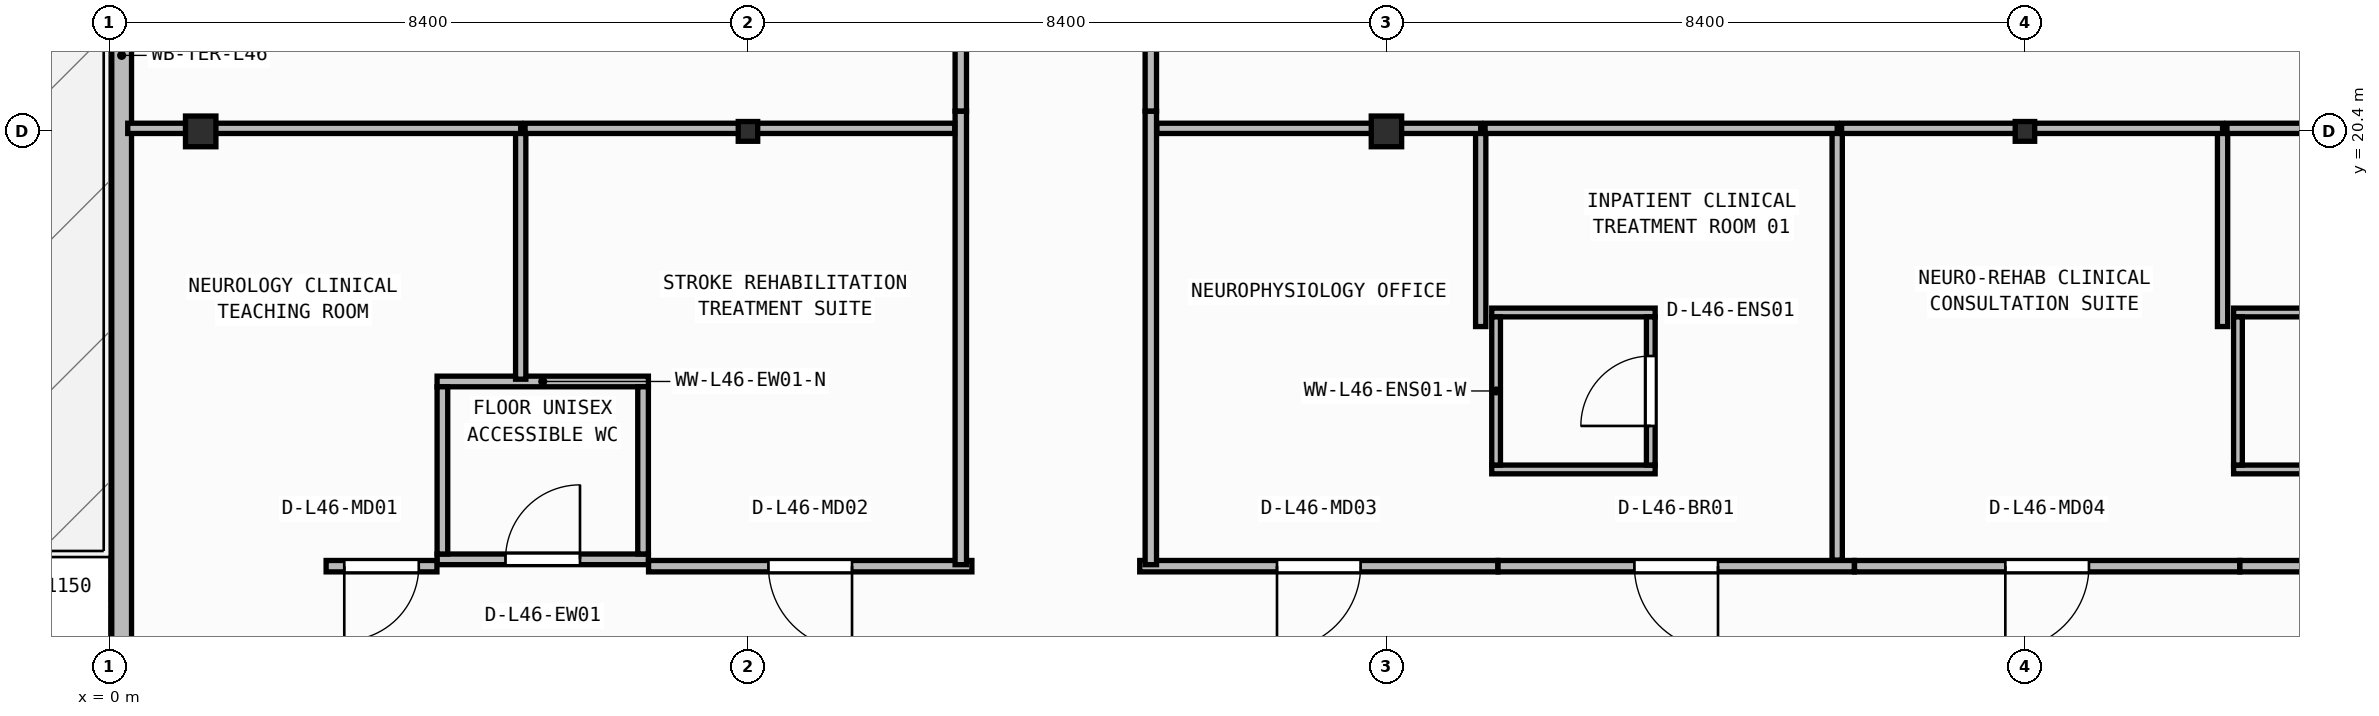
"""IFC4 building model, lengths in metres.
Left out: names, types, materials, properties, quantities, classifications, styles, units other than length and angle.
Written with IfcOpenShell. Run it as: python <this file> out.ifc"""

import sys

from ifc_helpers import new_model, si_unit, direction, frame, frame_2d, origin, origin_2d, place, context, subcontext, project, spatial, rectangle, i_section, extrude, element, fill, save


model = new_model("IFC4")
c1 = context("Model", 3, precision=1e-05, world=origin(), true_north=direction((0.0, 1.0)))
c2 = subcontext(c1, "Body", "Model", "MODEL_VIEW")
j1 = project(units=[si_unit("LENGTHUNIT", "METRE"), si_unit("PLANEANGLEUNIT", "RADIAN")], contexts=[c1])
p1 = place(None, origin())
s1 = spatial("IfcSite", under=j1, at=p1, CompositionType="ELEMENT")
p2 = place(p1, origin())
s2 = spatial("IfcBuilding", under=s1, at=p2, CompositionType="ELEMENT")
p3 = place(p2, frame((0.0, 0.0, 188.15)))
s3 = spatial("IfcBuildingStorey", under=s2, at=p3, CompositionType="ELEMENT", Elevation=188.15)
p4 = place(p3, frame((1.2, 20.4, 0.0), z_axis=(0.0, 0.0, 1.0), x_axis=(1.0, 0.0, 0.0)))
e1 = element("IfcColumn", 1, at=p4, inside=s3, PredefinedType="COLUMN", context=c2, shape_type="SweptSolid", body=[
    extrude(i_section(OverallWidth=0.4, OverallDepth=0.404, WebThickness=0.02, FlangeThickness=0.032, at=origin_2d()), origin(), (0.0, 0.0, 1.0), 3.95),
])
p5 = place(p3, frame((8.4, 20.4, 0.0), z_axis=(0.0, 0.0, 1.0), x_axis=(1.0, 0.0, 0.0)))
e2 = element("IfcColumn", 2, at=p5, inside=s3, PredefinedType="COLUMN", context=c2, shape_type="SweptSolid", body=[
    extrude(i_section(OverallWidth=0.256, OverallDepth=0.26, WebThickness=0.01, FlangeThickness=0.017, FilletRadius=0.013, at=origin_2d()), origin(), (0.0, 0.0, 1.0), 3.95),
])
p6 = place(p3, frame((16.8, 20.4, 0.0), z_axis=(0.0, 0.0, 1.0), x_axis=(1.0, 0.0, 0.0)))
e3 = element("IfcColumn", 3, at=p6, inside=s3, PredefinedType="COLUMN", context=c2, shape_type="SweptSolid", body=[
    extrude(i_section(OverallWidth=0.4, OverallDepth=0.404, WebThickness=0.02, FlangeThickness=0.032, at=origin_2d()), origin(), (0.0, 0.0, 1.0), 3.95),
])
p7 = place(p3, frame((25.2, 20.4, 0.0), z_axis=(0.0, 0.0, 1.0), x_axis=(1.0, 0.0, 0.0)))
e4 = element("IfcColumn", 4, at=p7, inside=s3, PredefinedType="COLUMN", context=c2, shape_type="SweptSolid", body=[
    extrude(i_section(OverallWidth=0.256, OverallDepth=0.26, WebThickness=0.01, FlangeThickness=0.017, FilletRadius=0.013, at=origin_2d()), origin(), (0.0, 0.0, 1.0), 3.95),
])
p8 = place(p3, frame((0.16, 40.14, 0.0), z_axis=(0.0, 0.0, 1.0), x_axis=(0.0, -1.0, 0.0)))
e5 = element("IfcWall", 5, at=p8, inside=s3, PredefinedType="STANDARD", context=c2, shape_type="SweptSolid", body=[
    extrude(rectangle(XDim=37.48, YDim=0.26, at=frame_2d((18.74, 0.0))), origin(), (0.0, 0.0, 1.0), 3.71),
])
p9 = place(p8, frame((13.926, 0.0, 0.0)))
e6 = element("IfcOpeningElement", 6, at=p9, cuts=e5, PredefinedType="OPENING", context=c2, shape_type="SweptSolid", body=[
    extrude(rectangle(XDim=1.3, YDim=2.15, at=frame_2d((0.65, 1.075))), frame((0.0, 0.14, 0.0), z_axis=(0.0, -1.0, 0.0), x_axis=(1.0, 0.0, 0.0)), (0.0, 0.0, 1.0), 0.28),
])
p10 = place(p3, frame((4.31, 14.77, 0.0), z_axis=(0.0, 0.0, 1.0), x_axis=(1.0, 0.0, 0.0)))
e7 = element("IfcWall", 7, at=p10, inside=s3, PredefinedType="PARTITIONING", context=c2, shape_type="SweptSolid", body=[
    extrude(rectangle(XDim=2.78, YDim=0.14, at=frame_2d((1.39, 0.0))), origin(), (0.0, 0.0, 1.0), 3.71),
])
p11 = place(p10, frame((0.9, 0.0, 0.0)))
e8 = element("IfcOpeningElement", 8, at=p11, cuts=e7, PredefinedType="OPENING", context=c2, shape_type="SweptSolid", body=[
    extrude(rectangle(XDim=0.98, YDim=2.1, at=frame_2d((0.49, 1.05))), frame((0.0, 0.08, 0.0), z_axis=(0.0, -1.0, 0.0), x_axis=(1.0, 0.0, 0.0)), (0.0, 0.0, 1.0), 0.16),
])
p12 = place(p3, frame((4.31, 17.11, 0.0), z_axis=(0.0, 0.0, 1.0), x_axis=(1.0, 0.0, 0.0)))
e9 = element("IfcWall", 9, at=p12, inside=s3, PredefinedType="PARTITIONING", context=c2, shape_type="SweptSolid", body=[
    extrude(rectangle(XDim=2.78, YDim=0.14, at=frame_2d((1.39, 0.0))), origin(), (0.0, 0.0, 1.0), 3.71),
])
for number, where, z_axis, x_axis in (
    (10, (4.38, 14.84, 0.0), (0.0, 0.0, 1.0), (0.0, 1.0, 0.0)),
    (11, (7.02, 14.84, 0.0), (0.0, 0.0, 1.0), (0.0, 1.0, 0.0)),
):
    element("IfcWall", number, at=place(p3, frame(where, z_axis=z_axis, x_axis=x_axis)), inside=s3, PredefinedType="PARTITIONING", context=c2, shape_type="SweptSolid", body=[
        extrude(rectangle(XDim=2.2, YDim=0.14, at=frame_2d((1.1, 0.0))), origin(), (0.0, 0.0, 1.0), 3.71),
    ])
for number, where, z_axis, x_axis in (
    (12, (18.185, 15.952, 0.0), (0.0, 0.0, 1.0), (1.0, 0.0, 0.0)),
    (13, (18.185, 18.018, 0.0), (0.0, 0.0, 1.0), (1.0, 0.0, 0.0)),
):
    element("IfcWall", number, at=place(p3, frame(where, z_axis=z_axis, x_axis=x_axis)), inside=s3, PredefinedType="PARTITIONING", context=c2, shape_type="SweptSolid", body=[
        extrude(rectangle(XDim=2.15, YDim=0.115, at=frame_2d((1.075, 0.0))), origin(), (0.0, 0.0, 1.0), 3.71),
    ])
p13 = place(p3, frame((18.242, 16.01, 0.0), z_axis=(0.0, 0.0, 1.0), x_axis=(0.0, 1.0, 0.0)))
e14 = element("IfcWall", 14, at=p13, inside=s3, PredefinedType="PARTITIONING", context=c2, shape_type="SweptSolid", body=[
    extrude(rectangle(XDim=1.95, YDim=0.115, at=frame_2d((0.975, 0.0))), origin(), (0.0, 0.0, 1.0), 3.71),
])
p14 = place(p3, frame((20.278, 16.01, 0.0), z_axis=(0.0, 0.0, 1.0), x_axis=(0.0, 1.0, 0.0)))
e15 = element("IfcWall", 15, at=p14, inside=s3, PredefinedType="PARTITIONING", context=c2, shape_type="SweptSolid", body=[
    extrude(rectangle(XDim=1.95, YDim=0.115, at=frame_2d((0.975, 0.0))), origin(), (0.0, 0.0, 1.0), 3.71),
])
p15 = place(p14, frame((0.515, 0.0, 0.0)))
e16 = element("IfcOpeningElement", 16, at=p15, cuts=e15, PredefinedType="OPENING", context=c2, shape_type="SweptSolid", body=[
    extrude(rectangle(XDim=0.92, YDim=2.1, at=frame_2d((0.46, 1.05))), frame((0.0, 0.067, 0.0), z_axis=(0.0, -1.0, 0.0), x_axis=(1.0, 0.0, 0.0)), (0.0, 0.0, 1.0), 0.135),
])
p16 = place(p3, frame((27.945, 15.952, 0.0), z_axis=(0.0, 0.0, 1.0), x_axis=(1.0, 0.0, 0.0)))
e17 = element("IfcWall", 17, at=p16, inside=s3, PredefinedType="PARTITIONING", context=c2, shape_type="SweptSolid", body=[
    extrude(rectangle(XDim=2.15, YDim=0.115, at=frame_2d((1.075, 0.0))), origin(), (0.0, 0.0, 1.0), 3.378),
])
p17 = place(p3, frame((27.945, 18.018, 0.0), z_axis=(0.0, 0.0, 1.0), x_axis=(1.0, 0.0, 0.0)))
e18 = element("IfcWall", 18, at=p17, inside=s3, PredefinedType="PARTITIONING", context=c2, shape_type="SweptSolid", body=[
    extrude(rectangle(XDim=2.15, YDim=0.115, at=frame_2d((1.075, 0.0))), origin(), (0.0, 0.0, 1.0), 3.71),
])
p18 = place(p3, frame((28.002, 16.01, 0.0), z_axis=(0.0, 0.0, 1.0), x_axis=(0.0, 1.0, 0.0)))
e19 = element("IfcWall", 19, at=p18, inside=s3, PredefinedType="PARTITIONING", context=c2, shape_type="SweptSolid", body=[
    extrude(rectangle(XDim=1.95, YDim=0.115, at=frame_2d((0.975, 0.0))), origin(), (0.0, 0.0, 1.0), 3.71),
])
p19 = place(p3, frame((4.308, 14.68, 0.0), z_axis=(0.0, 0.0, 1.0), x_axis=(-1.0, 0.0, 0.0)))
e20 = element("IfcWall", 20, at=p19, inside=s3, PredefinedType="PARTITIONING", context=c2, shape_type="SweptSolid", body=[
    extrude(rectangle(XDim=1.458, YDim=0.15, at=frame_2d((0.729, 0.0))), origin(), (0.0, 0.0, 1.0), 3.71),
])
p20 = place(p19, frame((0.239, 0.0, 0.0)))
e21 = element("IfcOpeningElement", 21, at=p20, cuts=e20, PredefinedType="OPENING", context=c2, shape_type="SweptSolid", body=[
    extrude(rectangle(XDim=0.98, YDim=2.1, at=frame_2d((0.49, 1.05))), frame((0.0, 0.085, 0.0), z_axis=(0.0, -1.0, 0.0), x_axis=(1.0, 0.0, 0.0)), (0.0, 0.0, 1.0), 0.17),
])
p21 = place(p3, frame((11.346, 14.68, 0.0), z_axis=(0.0, 0.0, 1.0), x_axis=(-1.0, 0.0, 0.0)))
e22 = element("IfcWall", 22, at=p21, inside=s3, PredefinedType="PARTITIONING", context=c2, shape_type="SweptSolid", body=[
    extrude(rectangle(XDim=4.254, YDim=0.15, at=frame_2d((2.127, 0.0))), origin(), (0.0, 0.0, 1.0), 3.71),
])
p22 = place(p21, frame((1.577, 0.0, 0.0)))
e23 = element("IfcOpeningElement", 23, at=p22, cuts=e22, PredefinedType="OPENING", context=c2, shape_type="SweptSolid", body=[
    extrude(rectangle(XDim=1.1, YDim=2.1, at=frame_2d((0.55, 1.05))), frame((0.0, 0.085, 0.0), z_axis=(0.0, -1.0, 0.0), x_axis=(1.0, 0.0, 0.0)), (0.0, 0.0, 1.0), 0.17),
])
p23 = place(p3, frame((18.266, 14.68, 0.0), z_axis=(0.0, 0.0, 1.0), x_axis=(-1.0, 0.0, 0.0)))
e24 = element("IfcWall", 24, at=p23, inside=s3, PredefinedType="PARTITIONING", context=c2, shape_type="SweptSolid", body=[
    extrude(rectangle(XDim=4.712, YDim=0.15, at=frame_2d((2.356, 0.0))), origin(), (0.0, 0.0, 1.0), 3.71),
])
p24 = place(p23, frame((1.806, 0.0, 0.0)))
e25 = element("IfcOpeningElement", 25, at=p24, cuts=e24, PredefinedType="OPENING", context=c2, shape_type="SweptSolid", body=[
    extrude(rectangle(XDim=1.1, YDim=2.1, at=frame_2d((0.55, 1.05))), frame((0.0, 0.085, 0.0), z_axis=(0.0, -1.0, 0.0), x_axis=(1.0, 0.0, 0.0)), (0.0, 0.0, 1.0), 0.17),
])
p25 = place(p3, frame((22.956, 14.68, 0.0), z_axis=(0.0, 0.0, 1.0), x_axis=(-1.0, 0.0, 0.0)))
e26 = element("IfcWall", 26, at=p25, inside=s3, PredefinedType="PARTITIONING", context=c2, shape_type="SweptSolid", body=[
    extrude(rectangle(XDim=4.688, YDim=0.15, at=frame_2d((2.344, 0.0))), origin(), (0.0, 0.0, 1.0), 3.71),
])
p26 = place(p25, frame((1.794, 0.0, 0.0)))
e27 = element("IfcOpeningElement", 27, at=p26, cuts=e26, PredefinedType="OPENING", context=c2, shape_type="SweptSolid", body=[
    extrude(rectangle(XDim=1.1, YDim=2.1, at=frame_2d((0.55, 1.05))), frame((0.0, 0.085, 0.0), z_axis=(0.0, -1.0, 0.0), x_axis=(1.0, 0.0, 0.0)), (0.0, 0.0, 1.0), 0.17),
])
p27 = place(p3, frame((28.026, 14.68, 0.0), z_axis=(0.0, 0.0, 1.0), x_axis=(-1.0, 0.0, 0.0)))
e28 = element("IfcWall", 28, at=p27, inside=s3, PredefinedType="PARTITIONING", context=c2, shape_type="SweptSolid", body=[
    extrude(rectangle(XDim=5.068, YDim=0.15, at=frame_2d((2.534, 0.0))), origin(), (0.0, 0.0, 1.0), 3.71),
])
p28 = place(p27, frame((1.984, 0.0, 0.0)))
e29 = element("IfcOpeningElement", 29, at=p28, cuts=e28, PredefinedType="OPENING", context=c2, shape_type="SweptSolid", body=[
    extrude(rectangle(XDim=1.1, YDim=2.1, at=frame_2d((0.55, 1.05))), frame((0.0, 0.085, 0.0), z_axis=(0.0, -1.0, 0.0), x_axis=(1.0, 0.0, 0.0)), (0.0, 0.0, 1.0), 0.17),
])
p29 = place(p3, frame((32.346, 14.68, 0.0), z_axis=(0.0, 0.0, 1.0), x_axis=(-1.0, 0.0, 0.0)))
e30 = element("IfcWall", 30, at=p29, inside=s3, PredefinedType="PARTITIONING", context=c2, shape_type="SweptSolid", body=[
    extrude(rectangle(XDim=4.318, YDim=0.15, at=frame_2d((2.159, 0.0))), origin(), (0.0, 0.0, 1.0), 3.71),
])
p30 = place(p29, frame((1.609, 0.0, 0.0)))
e31 = element("IfcOpeningElement", 31, at=p30, cuts=e30, PredefinedType="OPENING", context=c2, shape_type="SweptSolid", body=[
    extrude(rectangle(XDim=1.1, YDim=2.1, at=frame_2d((0.55, 1.05))), frame((0.0, 0.085, 0.0), z_axis=(0.0, -1.0, 0.0), x_axis=(1.0, 0.0, 0.0)), (0.0, 0.0, 1.0), 0.17),
])
for number, where, z_axis, x_axis in (
    (32, (11.2, 20.666, 0.0), (0.0, 0.0, 1.0), (0.0, -1.0, 0.0)),
    (33, (13.7, 14.7, 0.0), (0.0, 0.0, 1.0), (0.0, 1.0, 0.0)),
):
    element("IfcWall", number, at=place(p3, frame(where, z_axis=z_axis, x_axis=x_axis)), inside=s3, PredefinedType="PARTITIONING", context=c2, shape_type="SweptSolid", body=[
        extrude(rectangle(XDim=5.966, YDim=0.15, at=frame_2d((2.983, 0.0))), origin(), (0.0, 0.0, 1.0), 3.71),
    ])
p31 = place(p3, frame((11.2, 27.26, 0.0), z_axis=(0.0, 0.0, 1.0), x_axis=(0.0, -1.0, 0.0)))
e34 = element("IfcWall", 34, at=p31, inside=s3, PredefinedType="PARTITIONING", context=c2, shape_type="SweptSolid", body=[
    extrude(rectangle(XDim=6.592, YDim=0.15, at=frame_2d((3.296, 0.0))), origin(), (0.0, 0.0, 1.0), 3.71),
])
p32 = place(p31, frame((2.746, 0.0, 0.0)))
e35 = element("IfcOpeningElement", 35, at=p32, cuts=e34, PredefinedType="OPENING", context=c2, shape_type="SweptSolid", body=[
    extrude(rectangle(XDim=1.1, YDim=2.1, at=frame_2d((0.55, 1.05))), frame((0.0, 0.085, 0.0), z_axis=(0.0, -1.0, 0.0), x_axis=(1.0, 0.0, 0.0)), (0.0, 0.0, 1.0), 0.17),
])
p33 = place(p3, frame((13.7, 20.668, 0.0), z_axis=(0.0, 0.0, 1.0), x_axis=(0.0, 1.0, 0.0)))
e36 = element("IfcWall", 36, at=p33, inside=s3, PredefinedType="PARTITIONING", context=c2, shape_type="SweptSolid", body=[
    extrude(rectangle(XDim=6.592, YDim=0.15, at=frame_2d((3.296, 0.0))), origin(), (0.0, 0.0, 1.0), 3.71),
])
p34 = place(p33, frame((2.746, 0.0, 0.0)))
e37 = element("IfcOpeningElement", 37, at=p34, cuts=e36, PredefinedType="OPENING", context=c2, shape_type="SweptSolid", body=[
    extrude(rectangle(XDim=1.1, YDim=2.1, at=frame_2d((0.55, 1.05))), frame((0.0, 0.085, 0.0), z_axis=(0.0, -1.0, 0.0), x_axis=(1.0, 0.0, 0.0)), (0.0, 0.0, 1.0), 0.17),
])
p35 = place(p3, frame((5.41, 17.14, 0.0), z_axis=(0.0, 0.0, 1.0), x_axis=(0.0, 1.0, 0.0)))
e38 = element("IfcWall", 38, at=p35, inside=s3, PredefinedType="PARTITIONING", context=c2, shape_type="SweptSolid", body=[
    extrude(rectangle(XDim=3.3, YDim=0.135, at=frame_2d((1.65, 0.0))), origin(), (0.0, 0.0, 1.0), 3.71),
])
p36 = place(p3, frame((5.41, 20.44, 0.0), z_axis=(0.0, 0.0, 1.0), x_axis=(-1.0, 0.0, 0.0)))
e39 = element("IfcWall", 39, at=p36, inside=s3, PredefinedType="PARTITIONING", context=c2, shape_type="SweptSolid", body=[
    extrude(rectangle(XDim=5.17, YDim=0.135, at=frame_2d((2.585, 0.0))), origin(), (0.0, 0.0, 1.0), 3.152),
])
p37 = place(p3, frame((11.12, 20.44, 0.0), z_axis=(0.0, 0.0, 1.0), x_axis=(-1.0, 0.0, 0.0)))
e40 = element("IfcWall", 40, at=p37, inside=s3, PredefinedType="PARTITIONING", context=c2, shape_type="SweptSolid", body=[
    extrude(rectangle(XDim=5.653, YDim=0.135, at=frame_2d((2.826, 0.0))), origin(), (0.0, 0.0, 1.0), 3.152),
])
p38 = place(p3, frame((18.04, 17.833, 0.0), z_axis=(0.0, 0.0, 1.0), x_axis=(0.0, 1.0, 0.0)))
e41 = element("IfcWall", 41, at=p38, inside=s3, PredefinedType="PARTITIONING", context=c2, shape_type="SweptSolid", body=[
    extrude(rectangle(XDim=2.607, YDim=0.135, at=frame_2d((1.304, 0.0))), origin(), (0.0, 0.0, 1.0), 3.71),
])
p39 = place(p3, frame((18.04, 20.44, 0.0), z_axis=(0.0, 0.0, 1.0), x_axis=(-1.0, 0.0, 0.0)))
e42 = element("IfcWall", 42, at=p39, inside=s3, PredefinedType="PARTITIONING", context=c2, shape_type="SweptSolid", body=[
    extrude(rectangle(XDim=4.26, YDim=0.135, at=frame_2d((2.13, 0.0))), origin(), (0.0, 0.0, 1.0), 3.152),
])
p40 = place(p3, frame((22.73, 14.76, 0.0), z_axis=(0.0, 0.0, 1.0), x_axis=(0.0, 1.0, 0.0)))
e43 = element("IfcWall", 43, at=p40, inside=s3, PredefinedType="PARTITIONING", context=c2, shape_type="SweptSolid", body=[
    extrude(rectangle(XDim=5.68, YDim=0.135, at=frame_2d((2.84, 0.0))), origin(), (0.0, 0.0, 1.0), 3.71),
])
p41 = place(p3, frame((22.73, 20.44, 0.0), z_axis=(0.0, 0.0, 1.0), x_axis=(-1.0, 0.0, 0.0)))
e44 = element("IfcWall", 44, at=p41, inside=s3, PredefinedType="PARTITIONING", context=c2, shape_type="SweptSolid", body=[
    extrude(rectangle(XDim=4.633, YDim=0.135, at=frame_2d((2.316, 0.0))), origin(), (0.0, 0.0, 1.0), 3.152),
])
p42 = place(p3, frame((27.8, 17.833, 0.0), z_axis=(0.0, 0.0, 1.0), x_axis=(0.0, 1.0, 0.0)))
e45 = element("IfcWall", 45, at=p42, inside=s3, PredefinedType="PARTITIONING", context=c2, shape_type="SweptSolid", body=[
    extrude(rectangle(XDim=2.607, YDim=0.135, at=frame_2d((1.304, 0.0))), origin(), (0.0, 0.0, 1.0), 3.71),
])
p43 = place(p3, frame((27.8, 20.44, 0.0), z_axis=(0.0, 0.0, 1.0), x_axis=(-1.0, 0.0, 0.0)))
e46 = element("IfcWall", 46, at=p43, inside=s3, PredefinedType="PARTITIONING", context=c2, shape_type="SweptSolid", body=[
    extrude(rectangle(XDim=5.012, YDim=0.135, at=frame_2d((2.506, 0.0))), origin(), (0.0, 0.0, 1.0), 3.152),
])
p44 = place(p3, frame((30.137, 20.44, 0.0), z_axis=(0.0, 0.0, 1.0), x_axis=(-1.0, 0.0, 0.0)))
e47 = element("IfcWall", 47, at=p44, inside=s3, PredefinedType="PARTITIONING", context=c2, shape_type="SweptSolid", body=[
    extrude(rectangle(XDim=2.28, YDim=0.135, at=frame_2d((1.14, 0.0))), origin(), (0.0, 0.0, 1.0), 3.152),
])
p45 = place(p11, origin())
e48 = element("IfcDoor", 48, at=p45, inside=s3, OperationType="SINGLE_SWING_RIGHT", PredefinedType="DOOR", context=c2, shape_type="SweptSolid", body=[
    extrude(rectangle(XDim=0.98, YDim=2.1, at=frame_2d((0.49, 1.05))), frame((0.0, 0.025, 0.0), z_axis=(0.0, -1.0, 0.0), x_axis=(1.0, 0.0, 0.0)), (0.0, 0.0, 1.0), 0.05),
])
fill(e8, e48)
p46 = place(p15, origin())
e49 = element("IfcDoor", 49, at=p46, inside=s3, OperationType="SINGLE_SWING_LEFT", PredefinedType="DOOR", context=c2, shape_type="SweptSolid", body=[
    extrude(rectangle(XDim=0.92, YDim=2.1, at=frame_2d((0.46, 1.05))), frame((0.0, 0.025, 0.0), z_axis=(0.0, -1.0, 0.0), x_axis=(1.0, 0.0, 0.0)), (0.0, 0.0, 1.0), 0.05),
])
fill(e16, e49)
p47 = place(p20, origin())
e50 = element("IfcDoor", 50, at=p47, inside=s3, OperationType="SINGLE_SWING_RIGHT", PredefinedType="DOOR", context=c2, shape_type="SweptSolid", body=[
    extrude(rectangle(XDim=0.98, YDim=2.1, at=frame_2d((0.49, 1.05))), frame((0.0, 0.025, 0.0), z_axis=(0.0, -1.0, 0.0), x_axis=(1.0, 0.0, 0.0)), (0.0, 0.0, 1.0), 0.05),
])
fill(e21, e50)
p48 = place(p22, origin())
e51 = element("IfcDoor", 51, at=p48, inside=s3, OperationType="SINGLE_SWING_LEFT", PredefinedType="DOOR", context=c2, shape_type="SweptSolid", body=[
    extrude(rectangle(XDim=1.1, YDim=2.1, at=frame_2d((0.55, 1.05))), frame((0.0, 0.025, 0.0), z_axis=(0.0, -1.0, 0.0), x_axis=(1.0, 0.0, 0.0)), (0.0, 0.0, 1.0), 0.05),
])
fill(e23, e51)
p49 = place(p24, origin())
e52 = element("IfcDoor", 52, at=p49, inside=s3, OperationType="SINGLE_SWING_RIGHT", PredefinedType="DOOR", context=c2, shape_type="SweptSolid", body=[
    extrude(rectangle(XDim=1.1, YDim=2.1, at=frame_2d((0.55, 1.05))), frame((0.0, 0.025, 0.0), z_axis=(0.0, -1.0, 0.0), x_axis=(1.0, 0.0, 0.0)), (0.0, 0.0, 1.0), 0.05),
])
fill(e25, e52)
p50 = place(p26, origin())
e53 = element("IfcDoor", 53, at=p50, inside=s3, OperationType="SINGLE_SWING_LEFT", PredefinedType="DOOR", context=c2, shape_type="SweptSolid", body=[
    extrude(rectangle(XDim=1.1, YDim=2.1, at=frame_2d((0.55, 1.05))), frame((0.0, 0.025, 0.0), z_axis=(0.0, -1.0, 0.0), x_axis=(1.0, 0.0, 0.0)), (0.0, 0.0, 1.0), 0.05),
])
fill(e27, e53)
p51 = place(p28, origin())
e54 = element("IfcDoor", 54, at=p51, inside=s3, OperationType="SINGLE_SWING_RIGHT", PredefinedType="DOOR", context=c2, shape_type="SweptSolid", body=[
    extrude(rectangle(XDim=1.1, YDim=2.1, at=frame_2d((0.55, 1.05))), frame((0.0, 0.025, 0.0), z_axis=(0.0, -1.0, 0.0), x_axis=(1.0, 0.0, 0.0)), (0.0, 0.0, 1.0), 0.05),
])
fill(e29, e54)
save(model, sys.argv[1])
